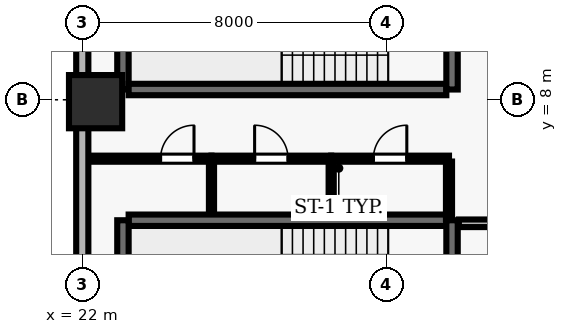
"""IFC4 building model, lengths in metres.
Left out: names, types, materials, properties, quantities, classifications, styles, units other than length and angle.
Written with IfcOpenShell. Run it as: python <this file> out.ifc"""

import sys

from ifc_helpers import new_model, si_unit, direction, frame, frame_2d, origin, origin_2d, place, context, subcontext, project, spatial, rectangle, extrude, element, fill, save


model = new_model("IFC4")
c1 = context("Model", 3, precision=1e-05, world=origin(), true_north=direction((0.0, 1.0)))
c2 = subcontext(c1, "Body", "Model", "MODEL_VIEW")
j1 = project(units=[si_unit("LENGTHUNIT", "METRE"), si_unit("PLANEANGLEUNIT", "RADIAN")], contexts=[c1])
p1 = place(None, origin())
s1 = spatial("IfcSite", under=j1, at=p1, CompositionType="ELEMENT")
p2 = place(p1, origin())
s2 = spatial("IfcBuilding", under=s1, at=p2, CompositionType="ELEMENT")
p3 = place(p2, frame((0.0, 0.0, 31.0)))
s3 = spatial("IfcBuildingStorey", under=s2, at=p3, CompositionType="ELEMENT", Elevation=31.0)
p4 = place(p3, frame((22.35, 7.95, 0.0), z_axis=(0.0, 0.0, 1.0), x_axis=(1.0, 0.0, 0.0)))
e1 = element("IfcColumn", 1, at=p4, inside=s3, PredefinedType="COLUMN", context=c2, shape_type="SweptSolid", body=[
    extrude(rectangle(XDim=1.4, YDim=1.4, at=origin_2d()), origin(), (0.0, 0.0, 1.0), 3.9),
])
p5 = place(p3, frame((22.0, 51.5, 0.0), z_axis=(0.0, 0.0, 1.0), x_axis=(0.0, -1.0, 0.0)))
e2 = element("IfcWall", 2, at=p5, inside=s3, PredefinedType="SOLIDWALL", context=c2, shape_type="SweptSolid", body=[
    extrude(rectangle(XDim=49.0, YDim=0.32, at=frame_2d((24.5, 0.0))), origin(), (0.0, 0.0, 1.0), 3.69),
])
p6 = place(p5, frame((12.1, 0.0, 0.0)))
e3 = element("IfcOpeningElement", 3, at=p6, cuts=e2, PredefinedType="OPENING", context=c2, shape_type="SweptSolid", body=[
    extrude(rectangle(XDim=1.0, YDim=2.2, at=frame_2d((0.5, 1.1))), frame((0.0, 0.17, 0.0), z_axis=(0.0, -1.0, 0.0), x_axis=(1.0, 0.0, 0.0)), (0.0, 0.0, 1.0), 0.34),
])
p7 = place(p5, frame((1.822, 0.0, 0.9)))
e4 = element("IfcOpeningElement", 4, at=p7, cuts=e2, PredefinedType="OPENING", context=c2, shape_type="SweptSolid", body=[
    extrude(rectangle(XDim=1.8, YDim=1.8, at=frame_2d((0.9, 0.9))), frame((0.0, 0.17, 0.0), z_axis=(0.0, -1.0, 0.0), x_axis=(1.0, 0.0, 0.0)), (0.0, 0.0, 1.0), 0.34),
])
p8 = place(p5, frame((7.267, 0.0, 0.9)))
e5 = element("IfcOpeningElement", 5, at=p8, cuts=e2, PredefinedType="OPENING", context=c2, shape_type="SweptSolid", body=[
    extrude(rectangle(XDim=1.8, YDim=1.8, at=frame_2d((0.9, 0.9))), frame((0.0, 0.17, 0.0), z_axis=(0.0, -1.0, 0.0), x_axis=(1.0, 0.0, 0.0)), (0.0, 0.0, 1.0), 0.34),
])
p9 = place(p5, frame((18.156, 0.0, 0.9)))
e6 = element("IfcOpeningElement", 6, at=p9, cuts=e2, PredefinedType="OPENING", context=c2, shape_type="SweptSolid", body=[
    extrude(rectangle(XDim=1.8, YDim=1.8, at=frame_2d((0.9, 0.9))), frame((0.0, 0.17, 0.0), z_axis=(0.0, -1.0, 0.0), x_axis=(1.0, 0.0, 0.0)), (0.0, 0.0, 1.0), 0.34),
])
p10 = place(p5, frame((23.15, 0.0, 0.9)))
e7 = element("IfcOpeningElement", 7, at=p10, cuts=e2, PredefinedType="OPENING", context=c2, shape_type="SweptSolid", body=[
    extrude(rectangle(XDim=1.8, YDim=1.8, at=frame_2d((0.9, 0.9))), frame((0.0, 0.17, 0.0), z_axis=(0.0, -1.0, 0.0), x_axis=(1.0, 0.0, 0.0)), (0.0, 0.0, 1.0), 0.34),
])
p11 = place(p5, frame((29.044, 0.0, 0.9)))
e8 = element("IfcOpeningElement", 8, at=p11, cuts=e2, PredefinedType="OPENING", context=c2, shape_type="SweptSolid", body=[
    extrude(rectangle(XDim=1.8, YDim=1.8, at=frame_2d((0.9, 0.9))), frame((0.0, 0.17, 0.0), z_axis=(0.0, -1.0, 0.0), x_axis=(1.0, 0.0, 0.0)), (0.0, 0.0, 1.0), 0.34),
])
p12 = place(p5, frame((34.039, 0.0, 0.9)))
e9 = element("IfcOpeningElement", 9, at=p12, cuts=e2, PredefinedType="OPENING", context=c2, shape_type="SweptSolid", body=[
    extrude(rectangle(XDim=1.8, YDim=1.8, at=frame_2d((0.9, 0.9))), frame((0.0, 0.17, 0.0), z_axis=(0.0, -1.0, 0.0), x_axis=(1.0, 0.0, 0.0)), (0.0, 0.0, 1.0), 0.34),
])
p13 = place(p5, frame((39.933, 0.0, 0.9)))
e10 = element("IfcOpeningElement", 10, at=p13, cuts=e2, PredefinedType="OPENING", context=c2, shape_type="SweptSolid", body=[
    extrude(rectangle(XDim=1.8, YDim=1.8, at=frame_2d((0.9, 0.9))), frame((0.0, 0.17, 0.0), z_axis=(0.0, -1.0, 0.0), x_axis=(1.0, 0.0, 0.0)), (0.0, 0.0, 1.0), 0.34),
])
p14 = place(p3, frame((31.58, 4.83, 0.0), z_axis=(0.0, 0.0, 1.0), x_axis=(-1.0, 0.0, 0.0)))
e11 = element("IfcWall", 11, at=p14, inside=s3, PredefinedType="SHEAR", context=c2, shape_type="SweptSolid", body=[
    extrude(rectangle(XDim=8.36, YDim=0.3, at=frame_2d((4.18, 0.0))), origin(), (0.0, 0.0, 1.0), 3.69),
])
p15 = place(p3, frame((23.07, 4.83, 0.0), z_axis=(0.0, 0.0, 1.0), x_axis=(0.0, -1.0, 0.0)))
e12 = element("IfcWall", 12, at=p15, inside=s3, PredefinedType="SHEAR", context=c2, shape_type="SweptSolid", body=[
    extrude(rectangle(XDim=3.51, YDim=0.3, at=frame_2d((1.755, 0.0))), origin(), (0.0, 0.0, 1.0), 3.69),
])
p16 = place(p3, frame((31.73, 0.96, 0.0), z_axis=(0.0, 0.0, 1.0), x_axis=(0.0, 1.0, 0.0)))
e13 = element("IfcWall", 13, at=p16, inside=s3, PredefinedType="SHEAR", context=c2, shape_type="SweptSolid", body=[
    extrude(rectangle(XDim=3.87, YDim=0.3, at=frame_2d((1.935, 0.0))), origin(), (0.0, 0.0, 1.0), 3.69),
])
p17 = place(p16, frame((1.54, 0.0, 0.0)))
e14 = element("IfcOpeningElement", 14, at=p17, cuts=e13, PredefinedType="OPENING", context=c2, shape_type="SweptSolid", body=[
    extrude(rectangle(XDim=1.15, YDim=2.15, at=frame_2d((0.575, 1.075))), frame((0.0, 0.16, 0.0), z_axis=(0.0, -1.0, 0.0), x_axis=(1.0, 0.0, 0.0)), (0.0, 0.0, 1.0), 0.32),
])
p18 = place(p3, frame((23.07, 11.78, 0.0), z_axis=(0.0, 0.0, 1.0), x_axis=(0.0, -1.0, 0.0)))
e15 = element("IfcWall", 15, at=p18, inside=s3, PredefinedType="SHEAR", context=c2, shape_type="SweptSolid", body=[
    extrude(rectangle(XDim=3.51, YDim=0.3, at=frame_2d((1.755, 0.0))), origin(), (0.0, 0.0, 1.0), 3.69),
])
p19 = place(p3, frame((23.22, 8.27, 0.0), z_axis=(0.0, 0.0, 1.0), x_axis=(1.0, 0.0, 0.0)))
e16 = element("IfcWall", 16, at=p19, inside=s3, PredefinedType="SHEAR", context=c2, shape_type="SweptSolid", body=[
    extrude(rectangle(XDim=8.36, YDim=0.3, at=frame_2d((4.18, 0.0))), origin(), (0.0, 0.0, 1.0), 3.69),
])
p20 = place(p3, frame((31.73, 8.27, 0.0), z_axis=(0.0, 0.0, 1.0), x_axis=(0.0, 1.0, 0.0)))
e17 = element("IfcWall", 17, at=p20, inside=s3, PredefinedType="SHEAR", context=c2, shape_type="SweptSolid", body=[
    extrude(rectangle(XDim=3.51, YDim=0.3, at=frame_2d((1.755, 0.0))), origin(), (0.0, 0.0, 1.0), 3.69),
])
p21 = place(p20, frame((1.18, 0.0, 0.0)))
e18 = element("IfcOpeningElement", 18, at=p21, cuts=e17, PredefinedType="OPENING", context=c2, shape_type="SweptSolid", body=[
    extrude(rectangle(XDim=1.15, YDim=2.15, at=frame_2d((0.575, 1.075))), frame((0.0, 0.16, 0.0), z_axis=(0.0, -1.0, 0.0), x_axis=(1.0, 0.0, 0.0)), (0.0, 0.0, 1.0), 0.32),
])
p22 = place(p3, frame((22.2, 6.45, 0.0), z_axis=(0.0, 0.0, 1.0), x_axis=(1.0, 0.0, 0.0)))
e19 = element("IfcWall", 19, at=p22, inside=s3, PredefinedType="PARTITIONING", context=c2, shape_type="SweptSolid", body=[
    extrude(rectangle(XDim=3.2, YDim=0.16, at=frame_2d((1.6, 0.0))), origin(), (0.0, 0.0, 1.0), 3.69),
])
p23 = place(p22, frame((1.86, 0.0, 0.0)))
e20 = element("IfcOpeningElement", 20, at=p23, cuts=e19, PredefinedType="OPENING", context=c2, shape_type="SweptSolid", body=[
    extrude(rectangle(XDim=0.88, YDim=2.1, at=frame_2d((0.44, 1.05))), frame((0.0, 0.09, 0.0), z_axis=(0.0, -1.0, 0.0), x_axis=(1.0, 0.0, 0.0)), (0.0, 0.0, 1.0), 0.18),
])
p24 = place(p3, frame((25.4, 6.45, 0.0), z_axis=(0.0, 0.0, 1.0), x_axis=(1.0, 0.0, 0.0)))
e21 = element("IfcWall", 21, at=p24, inside=s3, PredefinedType="PARTITIONING", context=c2, shape_type="SweptSolid", body=[
    extrude(rectangle(XDim=3.15, YDim=0.16, at=frame_2d((1.575, 0.0))), origin(), (0.0, 0.0, 1.0), 3.69),
])
p25 = place(p24, frame((1.135, 0.0, 0.0)))
e22 = element("IfcOpeningElement", 22, at=p25, cuts=e21, PredefinedType="OPENING", context=c2, shape_type="SweptSolid", body=[
    extrude(rectangle(XDim=0.88, YDim=2.1, at=frame_2d((0.44, 1.05))), frame((0.0, 0.09, 0.0), z_axis=(0.0, -1.0, 0.0), x_axis=(1.0, 0.0, 0.0)), (0.0, 0.0, 1.0), 0.18),
])
p26 = place(p3, frame((28.55, 6.45, 0.0), z_axis=(0.0, 0.0, 1.0), x_axis=(1.0, 0.0, 0.0)))
e23 = element("IfcWall", 23, at=p26, inside=s3, PredefinedType="PARTITIONING", context=c2, shape_type="SweptSolid", body=[
    extrude(rectangle(XDim=3.1, YDim=0.16, at=frame_2d((1.55, 0.0))), origin(), (0.0, 0.0, 1.0), 3.69),
])
p27 = place(p26, frame((1.11, 0.0, 0.0)))
e24 = element("IfcOpeningElement", 24, at=p27, cuts=e23, PredefinedType="OPENING", context=c2, shape_type="SweptSolid", body=[
    extrude(rectangle(XDim=0.88, YDim=2.1, at=frame_2d((0.44, 1.05))), frame((0.0, 0.09, 0.0), z_axis=(0.0, -1.0, 0.0), x_axis=(1.0, 0.0, 0.0)), (0.0, 0.0, 1.0), 0.18),
])
p28 = place(p3, frame((35.02, 4.75, 0.0), z_axis=(0.0, 0.0, 1.0), x_axis=(-1.0, 0.0, 0.0)))
e25 = element("IfcWall", 25, at=p28, inside=s3, PredefinedType="SOLIDWALL", context=c2, shape_type="SweptSolid", body=[
    extrude(rectangle(XDim=3.11, YDim=0.2, at=frame_2d((1.555, 0.0))), origin(), (0.0, 0.0, 1.0), 3.69),
])
p29 = place(p28, frame((1.03, 0.0, 0.0)))
e26 = element("IfcOpeningElement", 26, at=p29, cuts=e25, PredefinedType="OPENING", context=c2, shape_type="SweptSolid", body=[
    extrude(rectangle(XDim=1.05, YDim=2.15, at=frame_2d((0.525, 1.075))), frame((0.0, 0.11, 0.0), z_axis=(0.0, -1.0, 0.0), x_axis=(1.0, 0.0, 0.0)), (0.0, 0.0, 1.0), 0.22),
])
for number, where, z_axis, x_axis in (
    (27, (25.4, 5.01, 0.0), (0.0, 0.0, 1.0), (0.0, 1.0, 0.0)),
    (28, (28.55, 5.01, 0.0), (0.0, 0.0, 1.0), (0.0, 1.0, 0.0)),
):
    element("IfcWall", number, at=place(p3, frame(where, z_axis=z_axis, x_axis=x_axis)), inside=s3, PredefinedType="PARTITIONING", context=c2, shape_type="SweptSolid", body=[
        extrude(rectangle(XDim=1.365, YDim=0.135, at=frame_2d((0.683, 0.0))), origin(), (0.0, 0.0, 1.0), 3.69),
    ])
p30 = place(p3, frame((31.65, 4.86, 0.0), z_axis=(0.0, 0.0, 1.0), x_axis=(0.0, 1.0, 0.0)))
e29 = element("IfcWall", 29, at=p30, inside=s3, PredefinedType="PARTITIONING", context=c2, shape_type="SweptSolid", body=[
    extrude(rectangle(XDim=1.515, YDim=0.16, at=frame_2d((0.757, 0.0))), origin(), (0.0, 0.0, 1.0), 3.69),
])
p31 = place(p23, origin())
e30 = element("IfcDoor", 30, at=p31, inside=s3, OperationType="SINGLE_SWING_RIGHT", PredefinedType="DOOR", context=c2, shape_type="SweptSolid", body=[
    extrude(rectangle(XDim=0.88, YDim=2.1, at=frame_2d((0.44, 1.05))), frame((0.0, 0.025, 0.0), z_axis=(0.0, -1.0, 0.0), x_axis=(1.0, 0.0, 0.0)), (0.0, 0.0, 1.0), 0.05),
])
fill(e20, e30)
p32 = place(p25, origin())
e31 = element("IfcDoor", 31, at=p32, inside=s3, OperationType="SINGLE_SWING_LEFT", PredefinedType="DOOR", context=c2, shape_type="SweptSolid", body=[
    extrude(rectangle(XDim=0.88, YDim=2.1, at=frame_2d((0.44, 1.05))), frame((0.0, 0.025, 0.0), z_axis=(0.0, -1.0, 0.0), x_axis=(1.0, 0.0, 0.0)), (0.0, 0.0, 1.0), 0.05),
])
fill(e22, e31)
p33 = place(p27, origin())
e32 = element("IfcDoor", 32, at=p33, inside=s3, OperationType="SINGLE_SWING_RIGHT", PredefinedType="DOOR", context=c2, shape_type="SweptSolid", body=[
    extrude(rectangle(XDim=0.88, YDim=2.1, at=frame_2d((0.44, 1.05))), frame((0.0, 0.025, 0.0), z_axis=(0.0, -1.0, 0.0), x_axis=(1.0, 0.0, 0.0)), (0.0, 0.0, 1.0), 0.05),
])
fill(e24, e32)
save(model, sys.argv[1])
